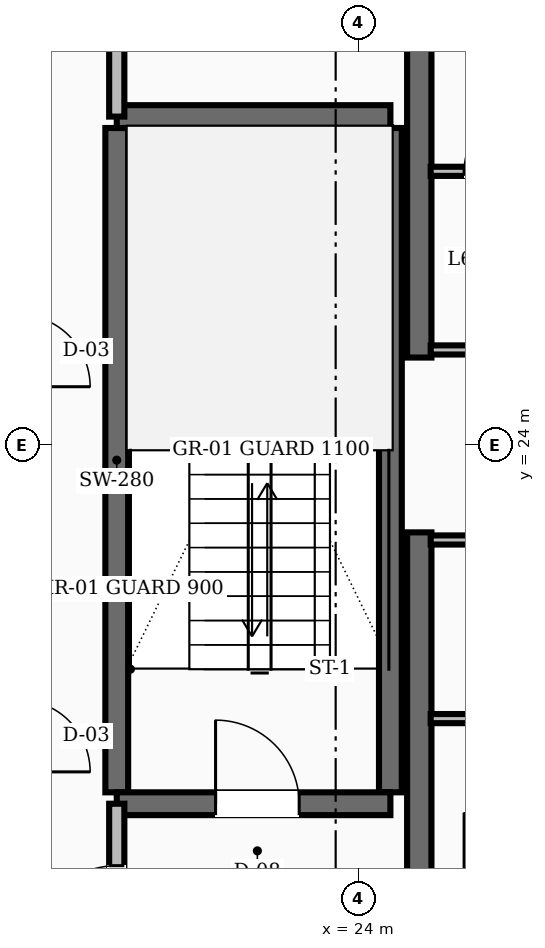
"""IFC4 building model, lengths in metres.
Left out: names, types, materials, properties, quantities, classifications, styles, units other than length and angle.
Written with IfcOpenShell. Run it as: python <this file> out.ifc"""

import sys

from ifc_helpers import new_model, si_unit, direction, frame, frame_2d, origin, place, context, subcontext, project, spatial, rectangle, extrude, element, fill, save


model = new_model("IFC4")
c1 = context("Model", 3, precision=1e-05, world=origin(), true_north=direction((0.0, 1.0)))
c2 = subcontext(c1, "Body", "Model", "MODEL_VIEW")
j1 = project(units=[si_unit("LENGTHUNIT", "METRE"), si_unit("PLANEANGLEUNIT", "RADIAN")], contexts=[c1])
p1 = place(None, origin())
s1 = spatial("IfcSite", under=j1, at=p1, CompositionType="ELEMENT")
p2 = place(p1, origin())
s2 = spatial("IfcBuilding", under=s1, at=p2, CompositionType="ELEMENT")
p3 = place(p2, frame((0.0, 0.0, 254.4)))
s3 = spatial("IfcBuildingStorey", under=s2, at=p3, CompositionType="ELEMENT", Elevation=254.4)
for number, where, z_axis, x_axis in (
    (1, (24.8, 16.55, 0.0), (0.0, 0.0, 1.0), (0.0, 1.0, 0.0)),
    (2, (24.8, 25.15, 0.0), (0.0, 0.0, 1.0), (0.0, 1.0, 0.0)),
):
    element("IfcWall", number, at=place(p3, frame(where, z_axis=z_axis, x_axis=x_axis)), inside=s3, PredefinedType="SHEAR", context=c2, shape_type="SweptSolid", body=[
        extrude(rectangle(XDim=6.3, YDim=0.32, at=frame_2d((3.15, 0.0))), origin(), (0.0, 0.0, 1.0), 3.6),
    ])
for number, where, z_axis, x_axis in (
    (3, (20.82, 19.43, 0.0), (0.0, 0.0, 1.0), (0.0, 1.0, 0.0)),
    (4, (24.42, 19.43, 0.0), (0.0, 0.0, 1.0), (0.0, 1.0, 0.0)),
):
    element("IfcWall", number, at=place(p3, frame(where, z_axis=z_axis, x_axis=x_axis)), inside=s3, PredefinedType="SHEAR", context=c2, shape_type="SweptSolid", body=[
        extrude(rectangle(XDim=8.74, YDim=0.3, at=frame_2d((4.37, 0.0))), origin(), (0.0, 0.0, 1.0), 3.6),
    ])
p4 = place(p3, frame((20.82, 19.28, 0.0), z_axis=(0.0, 0.0, 1.0), x_axis=(1.0, 0.0, 0.0)))
e5 = element("IfcWall", 5, at=p4, inside=s3, PredefinedType="SHEAR", context=c2, shape_type="SweptSolid", body=[
    extrude(rectangle(XDim=3.6, YDim=0.3, at=frame_2d((1.8, 0.0))), origin(), (0.0, 0.0, 1.0), 3.6),
])
p5 = place(p4, frame((1.3, 0.0, 0.0)))
e6 = element("IfcOpeningElement", 6, at=p5, cuts=e5, PredefinedType="OPENING", context=c2, shape_type="SweptSolid", body=[
    extrude(rectangle(XDim=1.1, YDim=2.1, at=frame_2d((0.55, 1.05))), frame((0.0, 0.16, 0.0), z_axis=(0.0, -1.0, 0.0), x_axis=(1.0, 0.0, 0.0)), (0.0, 0.0, 1.0), 0.32),
])
p6 = place(p3, frame((20.82, 28.32, 0.0), z_axis=(0.0, 0.0, 1.0), x_axis=(1.0, 0.0, 0.0)))
e7 = element("IfcWall", 7, at=p6, inside=s3, PredefinedType="SHEAR", context=c2, shape_type="SweptSolid", body=[
    extrude(rectangle(XDim=3.6, YDim=0.3, at=frame_2d((1.8, 0.0))), origin(), (0.0, 0.0, 1.0), 3.6),
])
p7 = place(p3, frame((20.82, 16.55, 0.0), z_axis=(0.0, 0.0, 1.0), x_axis=(0.0, 1.0, 0.0)))
e8 = element("IfcWall", 8, at=p7, inside=s3, PredefinedType="SOLIDWALL", context=c2, shape_type="SweptSolid", body=[
    extrude(rectangle(XDim=2.73, YDim=0.2, at=frame_2d((1.365, 0.0))), origin(), (0.0, 0.0, 1.0), 2.87),
])
p8 = place(p7, frame((0.815, 0.0, 0.0)))
e9 = element("IfcOpeningElement", 9, at=p8, cuts=e8, PredefinedType="OPENING", context=c2, shape_type="SweptSolid", body=[
    extrude(rectangle(XDim=1.1, YDim=2.1, at=frame_2d((0.55, 1.05))), frame((0.0, 0.11, 0.0), z_axis=(0.0, -1.0, 0.0), x_axis=(1.0, 0.0, 0.0)), (0.0, 0.0, 1.0), 0.22),
])
p9 = place(p3, frame((20.82, 28.32, 0.0), z_axis=(0.0, 0.0, 1.0), x_axis=(0.0, 1.0, 0.0)))
e10 = element("IfcWall", 10, at=p9, inside=s3, PredefinedType="SOLIDWALL", context=c2, shape_type="SweptSolid", body=[
    extrude(rectangle(XDim=3.13, YDim=0.2, at=frame_2d((1.565, 0.0))), origin(), (0.0, 0.0, 1.0), 2.87),
])
p10 = place(p9, frame((1.09, 0.0, 0.0)))
e11 = element("IfcOpeningElement", 11, at=p10, cuts=e10, PredefinedType="OPENING", context=c2, shape_type="SweptSolid", body=[
    extrude(rectangle(XDim=0.95, YDim=2.1, at=frame_2d((0.475, 1.05))), frame((0.0, 0.11, 0.0), z_axis=(0.0, -1.0, 0.0), x_axis=(1.0, 0.0, 0.0)), (0.0, 0.0, 1.0), 0.22),
])
p11 = place(p3, frame((24.95, 25.25, 0.0), z_axis=(0.0, 0.0, 1.0), x_axis=(1.0, 0.0, 0.0)))
e12 = element("IfcWall", 12, at=p11, inside=s3, PredefinedType="PARTITIONING", context=c2, shape_type="SweptSolid", body=[
    extrude(rectangle(XDim=3.2, YDim=0.12, at=frame_2d((1.6, 0.0))), origin(), (0.0, 0.0, 1.0), 2.87),
])
p12 = place(p11, frame((1.125, 0.0, 0.0)))
e13 = element("IfcOpeningElement", 13, at=p12, cuts=e12, PredefinedType="OPENING", context=c2, shape_type="SweptSolid", body=[
    extrude(rectangle(XDim=0.95, YDim=2.1, at=frame_2d((0.475, 1.05))), frame((0.0, 0.07, 0.0), z_axis=(0.0, -1.0, 0.0), x_axis=(1.0, 0.0, 0.0)), (0.0, 0.0, 1.0), 0.14),
])
p13 = place(p3, frame((24.95, 22.75, 0.0), z_axis=(0.0, 0.0, 1.0), x_axis=(1.0, 0.0, 0.0)))
e14 = element("IfcWall", 14, at=p13, inside=s3, PredefinedType="PARTITIONING", context=c2, shape_type="SweptSolid", body=[
    extrude(rectangle(XDim=3.2, YDim=0.12, at=frame_2d((1.6, 0.0))), origin(), (0.0, 0.0, 1.0), 2.87),
])
p14 = place(p13, frame((1.125, 0.0, 0.0)))
e15 = element("IfcOpeningElement", 15, at=p14, cuts=e14, PredefinedType="OPENING", context=c2, shape_type="SweptSolid", body=[
    extrude(rectangle(XDim=0.95, YDim=2.1, at=frame_2d((0.475, 1.05))), frame((0.0, 0.07, 0.0), z_axis=(0.0, -1.0, 0.0), x_axis=(1.0, 0.0, 0.0)), (0.0, 0.0, 1.0), 0.14),
])
p15 = place(p3, frame((24.95, 27.6, 0.0), z_axis=(0.0, 0.0, 1.0), x_axis=(1.0, 0.0, 0.0)))
e16 = element("IfcWall", 16, at=p15, inside=s3, PredefinedType="PARTITIONING", context=c2, shape_type="SweptSolid", body=[
    extrude(rectangle(XDim=3.2, YDim=0.12, at=frame_2d((1.6, 0.0))), origin(), (0.0, 0.0, 1.0), 2.87),
])
p16 = place(p15, frame((0.44, 0.0, 0.0)))
e17 = element("IfcOpeningElement", 17, at=p16, cuts=e16, PredefinedType="OPENING", context=c2, shape_type="SweptSolid", body=[
    extrude(rectangle(XDim=0.86, YDim=2.1, at=frame_2d((0.43, 1.05))), frame((0.0, 0.07, 0.0), z_axis=(0.0, -1.0, 0.0), x_axis=(1.0, 0.0, 0.0)), (0.0, 0.0, 1.0), 0.14),
])
p17 = place(p15, frame((1.9, 0.0, 0.0)))
e18 = element("IfcOpeningElement", 18, at=p17, cuts=e16, PredefinedType="OPENING", context=c2, shape_type="SweptSolid", body=[
    extrude(rectangle(XDim=0.86, YDim=2.1, at=frame_2d((0.43, 1.05))), frame((0.0, 0.07, 0.0), z_axis=(0.0, -1.0, 0.0), x_axis=(1.0, 0.0, 0.0)), (0.0, 0.0, 1.0), 0.14),
])
p18 = place(p3, frame((24.95, 20.4, 0.0), z_axis=(0.0, 0.0, 1.0), x_axis=(1.0, 0.0, 0.0)))
e19 = element("IfcWall", 19, at=p18, inside=s3, PredefinedType="PARTITIONING", context=c2, shape_type="SweptSolid", body=[
    extrude(rectangle(XDim=3.2, YDim=0.12, at=frame_2d((1.6, 0.0))), origin(), (0.0, 0.0, 1.0), 2.87),
])
p19 = place(p18, frame((1.125, 0.0, 0.0)))
e20 = element("IfcOpeningElement", 20, at=p19, cuts=e19, PredefinedType="OPENING", context=c2, shape_type="SweptSolid", body=[
    extrude(rectangle(XDim=0.95, YDim=2.1, at=frame_2d((0.475, 1.05))), frame((0.0, 0.07, 0.0), z_axis=(0.0, -1.0, 0.0), x_axis=(1.0, 0.0, 0.0)), (0.0, 0.0, 1.0), 0.14),
])
p20 = place(p5, origin())
e21 = element("IfcDoor", 21, at=p20, inside=s3, OperationType="SINGLE_SWING_LEFT", PredefinedType="DOOR", context=c2, shape_type="SweptSolid", body=[
    extrude(rectangle(XDim=1.1, YDim=2.1, at=frame_2d((0.55, 1.05))), frame((0.0, 0.025, 0.0), z_axis=(0.0, -1.0, 0.0), x_axis=(1.0, 0.0, 0.0)), (0.0, 0.0, 1.0), 0.05),
])
fill(e6, e21)
p21 = place(p8, origin())
e22 = element("IfcDoor", 22, at=p21, inside=s3, OperationType="SINGLE_SWING_LEFT", PredefinedType="DOOR", context=c2, shape_type="SweptSolid", body=[
    extrude(rectangle(XDim=1.1, YDim=2.1, at=frame_2d((0.55, 1.05))), frame((0.0, 0.025, 0.0), z_axis=(0.0, -1.0, 0.0), x_axis=(1.0, 0.0, 0.0)), (0.0, 0.0, 1.0), 0.05),
])
fill(e9, e22)
p22 = place(p16, origin())
e23 = element("IfcDoor", 23, at=p22, inside=s3, OperationType="SINGLE_SWING_RIGHT", PredefinedType="DOOR", context=c2, shape_type="SweptSolid", body=[
    extrude(rectangle(XDim=0.86, YDim=2.1, at=frame_2d((0.43, 1.05))), frame((0.0, 0.025, 0.0), z_axis=(0.0, -1.0, 0.0), x_axis=(1.0, 0.0, 0.0)), (0.0, 0.0, 1.0), 0.05),
])
fill(e17, e23)
save(model, sys.argv[1])
